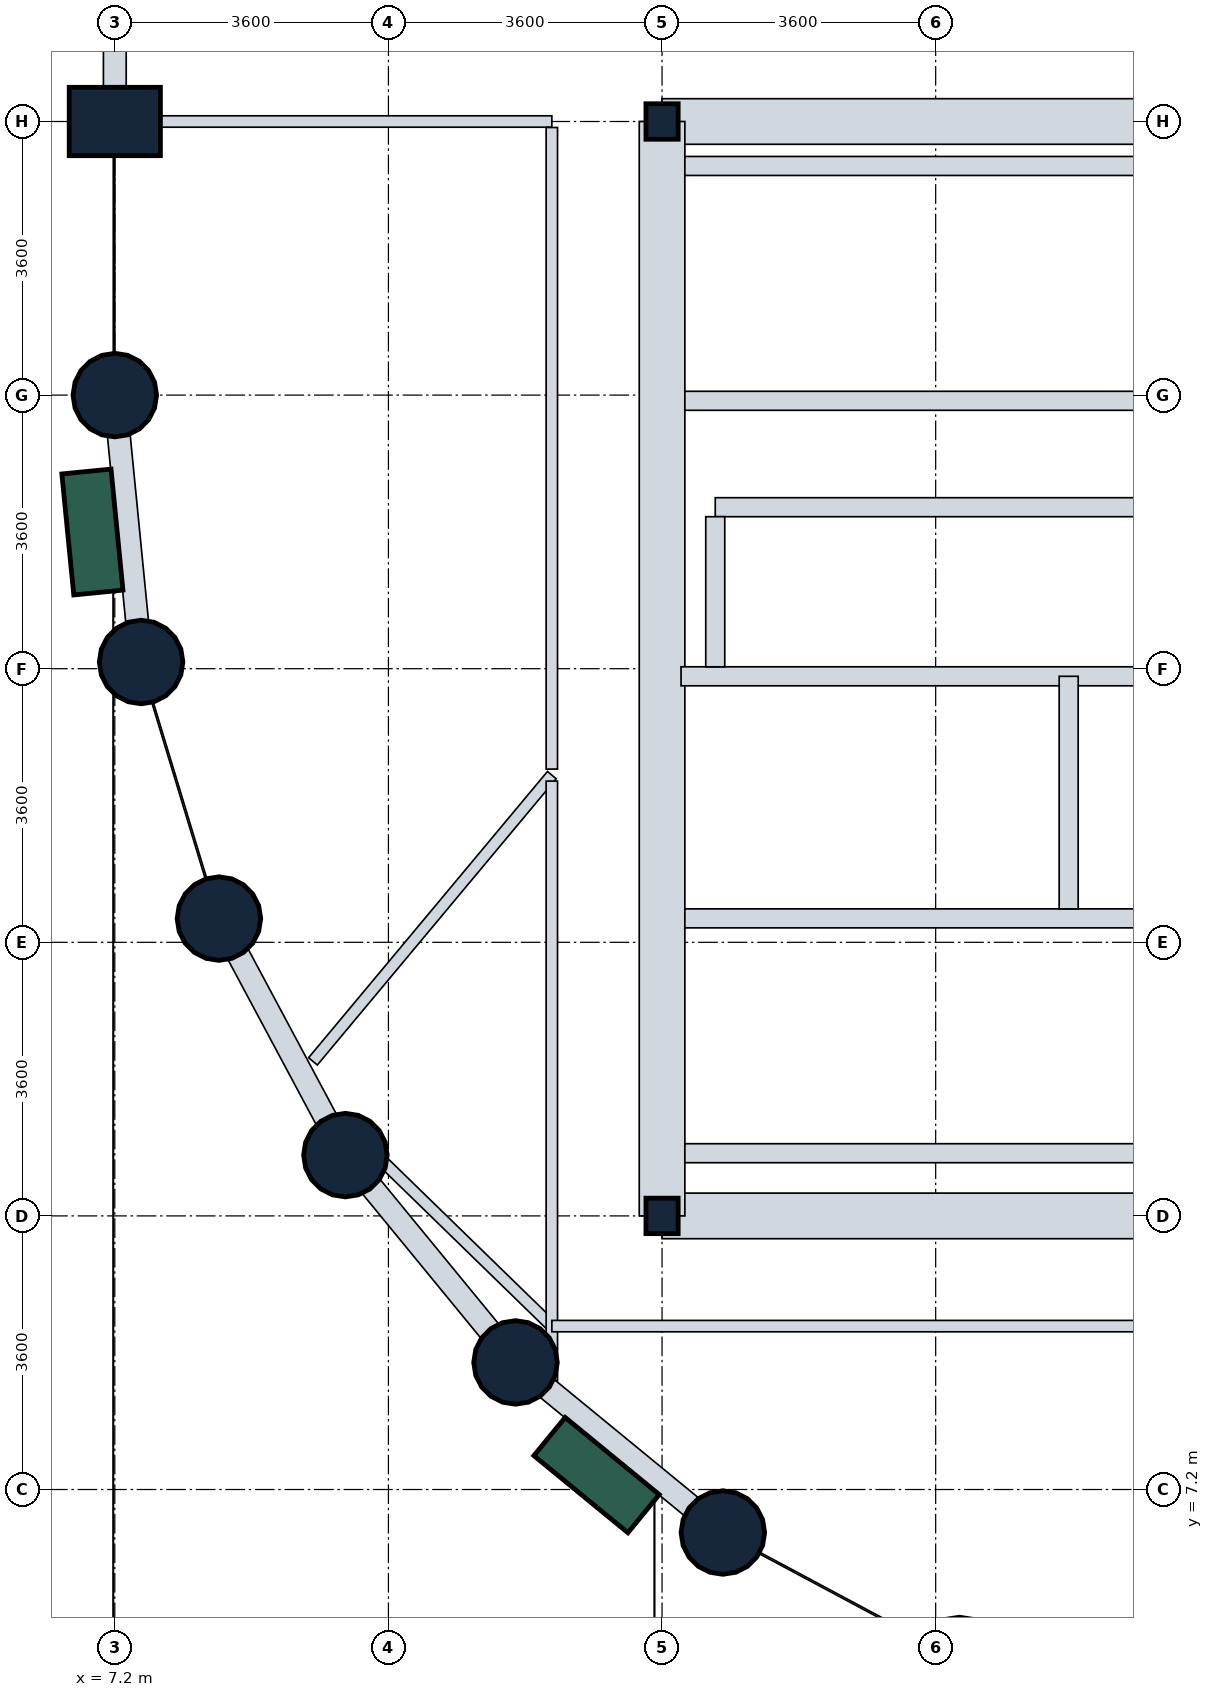
"""IFC4 building model, lengths in metres.
Left out: names, types, materials, properties, quantities, classifications, styles, units other than length and angle.
Written with IfcOpenShell. Run it as: python <this file> out.ifc"""

import sys

from ifc_helpers import new_model, si_unit, direction, frame, frame_2d, origin, origin_2d, place, context, subcontext, project, spatial, rectangle, circle, i_section, extrude, element, fill, save


model = new_model("IFC4")
c1 = context("Model", 3, precision=1e-05, world=origin(), true_north=direction((0.0, 1.0)))
c2 = subcontext(c1, "Body", "Model", "MODEL_VIEW")
j1 = project(units=[si_unit("LENGTHUNIT", "METRE"), si_unit("PLANEANGLEUNIT", "RADIAN")], contexts=[c1])
p1 = place(None, origin())
s1 = spatial("IfcSite", under=j1, at=p1, CompositionType="ELEMENT")
p2 = place(p1, origin())
s2 = spatial("IfcBuilding", under=s1, at=p2, CompositionType="ELEMENT")
p3 = place(p2, frame((0.0, 0.0, 24.0)))
s3 = spatial("IfcBuildingStorey", under=s2, at=p3, CompositionType="ELEMENT", Elevation=24.0)
p4 = place(p3, frame((7.2, 21.6, 0.0), z_axis=(0.0, 0.0, 1.0), x_axis=(1.0, 0.0, 0.0)))
e1 = element("IfcColumn", 1, at=p4, inside=s3, PredefinedType="COLUMN", context=c2, shape_type="SweptSolid", body=[
    extrude(circle(Radius=0.55, at=origin_2d()), origin(), (0.0, 0.0, 1.0), 3.9),
])
p5 = place(p3, frame((7.2, 25.2, 0.0), z_axis=(0.0, 0.0, 1.0), x_axis=(0.0, 1.0, 0.0)))
e2 = element("IfcColumn", 2, at=p5, inside=s3, PredefinedType="COLUMN", context=c2, shape_type="SweptSolid", body=[
    extrude(rectangle(XDim=0.9, YDim=1.2, at=origin_2d()), origin(), (0.0, 0.0, 1.0), 3.9),
])
for number, where, z_axis, x_axis in (
    (3, (7.546, 18.088, 0.0), (0.0, 0.0, 1.0), (1.0, 0.0, 0.0)),
    (4, (8.57, 14.712, 0.0), (0.0, 0.0, 1.0), (1.0, 0.0, 0.0)),
    (5, (10.234, 11.6, 0.0), (0.0, 0.0, 1.0), (1.0, 0.0, 0.0)),
    (6, (12.472, 8.872, 0.0), (0.0, 0.0, 1.0), (1.0, 0.0, 0.0)),
):
    element("IfcColumn", number, at=place(p3, frame(where, z_axis=z_axis, x_axis=x_axis)), inside=s3, PredefinedType="COLUMN", context=c2, shape_type="SweptSolid", body=[
        extrude(circle(Radius=0.55, at=origin_2d()), origin(), (0.0, 0.0, 1.0), 3.9),
    ])
for number, where, z_axis, x_axis in (
    (7, (14.4, 10.8, 0.0), (0.0, 0.0, 1.0), (1.0, 0.0, 0.0)),
    (8, (14.4, 25.2, 0.0), (0.0, 0.0, 1.0), (1.0, 0.0, 0.0)),
):
    element("IfcColumn", number, at=place(p3, frame(where, z_axis=z_axis, x_axis=x_axis)), inside=s3, PredefinedType="COLUMN", context=c2, shape_type="SweptSolid", body=[
        extrude(i_section(OverallWidth=0.424, OverallDepth=0.467, WebThickness=0.033, FlangeThickness=0.053, FilletRadius=0.015, at=origin_2d()), origin(), (0.0, 0.0, 1.0), 3.9),
    ])
p6 = place(p3, frame((15.2, 6.634, 0.0), z_axis=(0.0, 0.0, 1.0), x_axis=(1.0, 0.0, 0.0)))
e9 = element("IfcColumn", 9, at=p6, inside=s3, PredefinedType="COLUMN", context=c2, shape_type="SweptSolid", body=[
    extrude(circle(Radius=0.55, at=origin_2d()), origin(), (0.0, 0.0, 1.0), 3.9),
])
p7 = place(p3, frame((7.2, 25.2, 0.0), z_axis=(0.0, 0.0, 1.0), x_axis=(0.0, 1.0, 0.0)))
e10 = element("IfcWall", 10, at=p7, inside=s3, PredefinedType="STANDARD", context=c2, shape_type="SweptSolid", body=[
    extrude(rectangle(XDim=3.6, YDim=0.3, at=frame_2d((1.8, 0.0))), origin(), (0.0, 0.0, 1.0), 2.93),
])
p8 = place(p3, frame((7.546, 18.088, 0.0), z_axis=(0.0, 0.0, 1.0), x_axis=(-0.09802417461, 0.995184033831, 0.0)))
e11 = element("IfcWall", 11, at=p8, inside=s3, PredefinedType="STANDARD", context=c2, shape_type="SweptSolid", body=[
    extrude(rectangle(XDim=3.529, YDim=0.3, at=frame_2d((1.765, 0.0))), origin(), (0.0, 0.0, 1.0), 2.93),
])
p9 = place(p8, frame((0.965, 0.0, 0.85)))
e12 = element("IfcOpeningElement", 12, at=p9, cuts=e11, PredefinedType="OPENING", context=c2, shape_type="SweptSolid", body=[
    extrude(rectangle(XDim=1.6, YDim=1.35, at=frame_2d((0.8, 0.675))), frame((0.0, 0.16, 0.0), z_axis=(0.0, -1.0, 0.0), x_axis=(1.0, 0.0, 0.0)), (0.0, 0.0, 1.0), 0.32),
])
p10 = place(p3, frame((10.234, 11.6, 0.0), z_axis=(0.0, 0.0, 1.0), x_axis=(-0.47151087309, 0.881860247748, 0.0)))
e13 = element("IfcWall", 13, at=p10, inside=s3, PredefinedType="STANDARD", context=c2, shape_type="SweptSolid", body=[
    extrude(rectangle(XDim=3.529, YDim=0.3, at=frame_2d((1.764, 0.0))), origin(), (0.0, 0.0, 1.0), 2.93),
])
p11 = place(p3, frame((12.472, 8.872, 0.0), z_axis=(0.0, 0.0, 1.0), x_axis=(-0.634258295121, 0.773121216285, 0.0)))
e14 = element("IfcWall", 14, at=p11, inside=s3, PredefinedType="STANDARD", context=c2, shape_type="SweptSolid", body=[
    extrude(rectangle(XDim=3.529, YDim=0.3, at=frame_2d((1.764, 0.0))), origin(), (0.0, 0.0, 1.0), 2.93),
])
p12 = place(p3, frame((15.2, 6.634, 0.0), z_axis=(0.0, 0.0, 1.0), x_axis=(-0.773121216285, 0.634258295121, 0.0)))
e15 = element("IfcWall", 15, at=p12, inside=s3, PredefinedType="STANDARD", context=c2, shape_type="SweptSolid", body=[
    extrude(rectangle(XDim=3.529, YDim=0.3, at=frame_2d((1.764, 0.0))), origin(), (0.0, 0.0, 1.0), 2.93),
])
p13 = place(p12, frame((0.964, 0.0, 0.85)))
e16 = element("IfcOpeningElement", 16, at=p13, cuts=e15, PredefinedType="OPENING", context=c2, shape_type="SweptSolid", body=[
    extrude(rectangle(XDim=1.6, YDim=1.35, at=frame_2d((0.8, 0.675))), frame((0.0, 0.16, 0.0), z_axis=(0.0, -1.0, 0.0), x_axis=(1.0, 0.0, 0.0)), (0.0, 0.0, 1.0), 0.32),
])
p14 = place(p3, frame((14.4, 10.8, 0.0), z_axis=(0.0, 0.0, 1.0), x_axis=(1.0, 0.0, 0.0)))
e17 = element("IfcWall", 17, at=p14, inside=s3, PredefinedType="SHEAR", context=c2, shape_type="SweptSolid", body=[
    extrude(rectangle(XDim=18.0, YDim=0.6, at=frame_2d((9.0, 0.0))), origin(), (0.0, 0.0, 1.0), 3.65),
])
p15 = place(p3, frame((14.4, 25.2, 0.0), z_axis=(0.0, 0.0, 1.0), x_axis=(1.0, 0.0, 0.0)))
e18 = element("IfcWall", 18, at=p15, inside=s3, PredefinedType="SHEAR", context=c2, shape_type="SweptSolid", body=[
    extrude(rectangle(XDim=14.4, YDim=0.6, at=frame_2d((7.2, 0.0))), origin(), (0.0, 0.0, 1.0), 3.65),
])
p16 = place(p3, frame((14.4, 10.8, 0.0), z_axis=(0.0, 0.0, 1.0), x_axis=(0.0, 1.0, 0.0)))
e19 = element("IfcWall", 19, at=p16, inside=s3, PredefinedType="SHEAR", context=c2, shape_type="SweptSolid", body=[
    extrude(rectangle(XDim=14.4, YDim=0.6, at=frame_2d((7.2, 0.0))), origin(), (0.0, 0.0, 1.0), 3.65),
])
p17 = place(p16, frame((11.05, 0.0, 0.0)))
e20 = element("IfcOpeningElement", 20, at=p17, cuts=e19, PredefinedType="OPENING", context=c2, shape_type="SweptSolid", body=[
    extrude(rectangle(XDim=1.1, YDim=2.1, at=frame_2d((0.55, 1.05))), frame((0.0, 0.31, 0.0), z_axis=(0.0, -1.0, 0.0), x_axis=(1.0, 0.0, 0.0)), (0.0, 0.0, 1.0), 0.62),
])
p18 = place(p16, frame((4.9, 0.0, 0.0)))
e21 = element("IfcOpeningElement", 21, at=p18, cuts=e19, PredefinedType="OPENING", context=c2, shape_type="SweptSolid", body=[
    extrude(rectangle(XDim=1.2, YDim=2.1, at=frame_2d((0.6, 1.05))), frame((0.0, 0.31, 0.0), z_axis=(0.0, -1.0, 0.0), x_axis=(1.0, 0.0, 0.0)), (0.0, 0.0, 1.0), 0.62),
])
p19 = place(p3, frame((14.7, 11.625, 0.0), z_axis=(0.0, 0.0, 1.0), x_axis=(1.0, 0.0, 0.0)))
e22 = element("IfcWall", 22, at=p19, inside=s3, PredefinedType="SHEAR", context=c2, shape_type="SweptSolid", body=[
    extrude(rectangle(XDim=8.65, YDim=0.25, at=frame_2d((4.325, 0.0))), origin(), (0.0, 0.0, 1.0), 3.65),
])
p20 = place(p3, frame((14.7, 14.715, 0.0), z_axis=(0.0, 0.0, 1.0), x_axis=(1.0, 0.0, 0.0)))
e23 = element("IfcWall", 23, at=p20, inside=s3, PredefinedType="SHEAR", context=c2, shape_type="SweptSolid", body=[
    extrude(rectangle(XDim=8.65, YDim=0.25, at=frame_2d((4.325, 0.0))), origin(), (0.0, 0.0, 1.0), 3.65),
])
p21 = place(p20, frame((0.655, 0.0, 0.0)))
e24 = element("IfcOpeningElement", 24, at=p21, cuts=e23, PredefinedType="OPENING", context=c2, shape_type="SweptSolid", body=[
    extrude(rectangle(XDim=1.1, YDim=2.1, at=frame_2d((0.55, 1.05))), frame((0.0, 0.135, 0.0), z_axis=(0.0, -1.0, 0.0), x_axis=(1.0, 0.0, 0.0)), (0.0, 0.0, 1.0), 0.27),
])
for number, where, z_axis, x_axis in (
    (25, (14.7, 21.525, 0.0), (0.0, 0.0, 1.0), (1.0, 0.0, 0.0)),
    (26, (14.7, 24.615, 0.0), (0.0, 0.0, 1.0), (1.0, 0.0, 0.0)),
):
    element("IfcWall", number, at=place(p3, frame(where, z_axis=z_axis, x_axis=x_axis)), inside=s3, PredefinedType="SHEAR", context=c2, shape_type="SweptSolid", body=[
        extrude(rectangle(XDim=8.2, YDim=0.25, at=frame_2d((4.1, 0.0))), origin(), (0.0, 0.0, 1.0), 3.65),
    ])
p22 = place(p3, frame((14.65, 17.9, 0.0), z_axis=(0.0, 0.0, 1.0), x_axis=(1.0, 0.0, 0.0)))
e27 = element("IfcWall", 27, at=p22, inside=s3, PredefinedType="PARTITIONING", context=c2, shape_type="SweptSolid", body=[
    extrude(rectangle(XDim=7.15, YDim=0.25, at=frame_2d((3.575, 0.0))), origin(), (0.0, 0.0, 1.0), 3.635),
])
p23 = place(p3, frame((19.75, 14.84, 0.0), z_axis=(0.0, 0.0, 1.0), x_axis=(0.0, 1.0, 0.0)))
e28 = element("IfcWall", 28, at=p23, inside=s3, PredefinedType="PARTITIONING", context=c2, shape_type="SweptSolid", body=[
    extrude(rectangle(XDim=3.06, YDim=0.25, at=frame_2d((1.53, 0.0))), origin(), (0.0, 0.0, 1.0), 3.635),
])
p24 = place(p23, frame((0.98, 0.0, 0.0)))
e29 = element("IfcOpeningElement", 29, at=p24, cuts=e28, PredefinedType="OPENING", context=c2, shape_type="SweptSolid", body=[
    extrude(rectangle(XDim=1.1, YDim=2.1, at=frame_2d((0.55, 1.05))), frame((0.0, 0.135, 0.0), z_axis=(0.0, -1.0, 0.0), x_axis=(1.0, 0.0, 0.0)), (0.0, 0.0, 1.0), 0.27),
])
p25 = place(p3, frame((15.1, 20.125, 0.0), z_axis=(0.0, 0.0, 1.0), x_axis=(1.0, 0.0, 0.0)))
e30 = element("IfcWall", 30, at=p25, inside=s3, PredefinedType="PARTITIONING", context=c2, shape_type="SweptSolid", body=[
    extrude(rectangle(XDim=7.55, YDim=0.25, at=frame_2d((3.775, 0.0))), origin(), (0.0, 0.0, 1.0), 3.635),
])
p26 = place(p25, frame((0.45, 0.0, 0.0)))
e31 = element("IfcOpeningElement", 31, at=p26, cuts=e30, PredefinedType="OPENING", context=c2, shape_type="SweptSolid", body=[
    extrude(rectangle(XDim=1.1, YDim=2.1, at=frame_2d((0.55, 1.05))), frame((0.0, 0.135, 0.0), z_axis=(0.0, -1.0, 0.0), x_axis=(1.0, 0.0, 0.0)), (0.0, 0.0, 1.0), 0.27),
])
p27 = place(p25, frame((2.3, 0.0, 0.0)))
e32 = element("IfcOpeningElement", 32, at=p27, cuts=e30, PredefinedType="OPENING", context=c2, shape_type="SweptSolid", body=[
    extrude(rectangle(XDim=1.1, YDim=2.1, at=frame_2d((0.55, 1.05))), frame((0.0, 0.135, 0.0), z_axis=(0.0, -1.0, 0.0), x_axis=(1.0, 0.0, 0.0)), (0.0, 0.0, 1.0), 0.27),
])
p28 = place(p25, frame((4.15, 0.0, 0.0)))
e33 = element("IfcOpeningElement", 33, at=p28, cuts=e30, PredefinedType="OPENING", context=c2, shape_type="SweptSolid", body=[
    extrude(rectangle(XDim=1.1, YDim=2.1, at=frame_2d((0.55, 1.05))), frame((0.0, 0.135, 0.0), z_axis=(0.0, -1.0, 0.0), x_axis=(1.0, 0.0, 0.0)), (0.0, 0.0, 1.0), 0.27),
])
p29 = place(p25, frame((6.0, 0.0, 0.0)))
e34 = element("IfcOpeningElement", 34, at=p29, cuts=e30, PredefinedType="OPENING", context=c2, shape_type="SweptSolid", body=[
    extrude(rectangle(XDim=1.1, YDim=2.1, at=frame_2d((0.55, 1.05))), frame((0.0, 0.135, 0.0), z_axis=(0.0, -1.0, 0.0), x_axis=(1.0, 0.0, 0.0)), (0.0, 0.0, 1.0), 0.27),
])
p30 = place(p3, frame((15.1, 18.025, 0.0), z_axis=(0.0, 0.0, 1.0), x_axis=(0.0, 1.0, 0.0)))
e35 = element("IfcWall", 35, at=p30, inside=s3, PredefinedType="PARTITIONING", context=c2, shape_type="SweptSolid", body=[
    extrude(rectangle(XDim=1.975, YDim=0.25, at=frame_2d((0.988, 0.0))), origin(), (0.0, 0.0, 1.0), 3.635),
])
p31 = place(p3, frame((7.354, 25.2, 0.0), z_axis=(0.0, 0.0, 1.0), x_axis=(1.0, 0.0, 0.0)))
e36 = element("IfcWall", 36, at=p31, inside=s3, PredefinedType="PARTITIONING", context=c2, shape_type="SweptSolid", body=[
    extrude(rectangle(XDim=5.596, YDim=0.15, at=frame_2d((2.798, 0.0))), origin(), (0.0, 0.0, 1.0), 3.635),
])
p32 = place(p3, frame((12.95, 9.35, 0.0), z_axis=(0.0, 0.0, 1.0), x_axis=(-0.716473772124, 0.697614029287, 0.0)))
e37 = element("IfcWall", 37, at=p32, inside=s3, PredefinedType="PARTITIONING", context=c2, shape_type="SweptSolid", body=[
    extrude(rectangle(XDim=3.728, YDim=0.15, at=frame_2d((1.864, 0.0))), origin(), (0.0, 0.0, 1.0), 2.93),
])
p33 = place(p3, frame((12.95, 16.6, 0.0), z_axis=(0.0, 0.0, 1.0), x_axis=(-0.640693345459, -0.767796872281, 0.0)))
e38 = element("IfcWall", 38, at=p33, inside=s3, PredefinedType="PARTITIONING", context=c2, shape_type="SweptSolid", body=[
    extrude(rectangle(XDim=4.906, YDim=0.15, at=frame_2d((2.453, 0.0))), origin(), (0.0, 0.0, 1.0), 2.93),
])
p34 = place(p3, frame((12.95, 16.679, 0.0), z_axis=(0.0, 0.0, 1.0), x_axis=(0.0, 1.0, 0.0)))
e39 = element("IfcWall", 39, at=p34, inside=s3, PredefinedType="PARTITIONING", context=c2, shape_type="SweptSolid", body=[
    extrude(rectangle(XDim=8.442, YDim=0.15, at=frame_2d((4.221, 0.0))), origin(), (0.0, 0.0, 1.0), 3.08),
])
p35 = place(p34, frame((3.721, 0.0, 0.0)))
e40 = element("IfcOpeningElement", 40, at=p35, cuts=e39, PredefinedType="OPENING", context=c2, shape_type="SweptSolid", body=[
    extrude(rectangle(XDim=1.0, YDim=2.1, at=frame_2d((0.5, 1.05))), frame((0.0, 0.085, 0.0), z_axis=(0.0, -1.0, 0.0), x_axis=(1.0, 0.0, 0.0)), (0.0, 0.0, 1.0), 0.17),
])
p36 = place(p3, frame((12.95, 8.634, 0.0), z_axis=(0.0, 0.0, 1.0), x_axis=(0.0, 1.0, 0.0)))
e41 = element("IfcWall", 41, at=p36, inside=s3, PredefinedType="PARTITIONING", context=c2, shape_type="SweptSolid", body=[
    extrude(rectangle(XDim=7.887, YDim=0.15, at=frame_2d((3.944, 0.0))), origin(), (0.0, 0.0, 1.0), 2.93),
])
p37 = place(p36, frame((4.947, 0.0, 0.0)))
e42 = element("IfcOpeningElement", 42, at=p37, cuts=e41, PredefinedType="OPENING", context=c2, shape_type="SweptSolid", body=[
    extrude(rectangle(XDim=1.0, YDim=2.1, at=frame_2d((0.5, 1.05))), frame((0.0, 0.085, 0.0), z_axis=(0.0, -1.0, 0.0), x_axis=(1.0, 0.0, 0.0)), (0.0, 0.0, 1.0), 0.17),
])
p38 = place(p3, frame((12.95, 9.35, 0.0), z_axis=(0.0, 0.0, 1.0), x_axis=(1.0, 0.0, 0.0)))
e43 = element("IfcWall", 43, at=p38, inside=s3, PredefinedType="PARTITIONING", context=c2, shape_type="SweptSolid", body=[
    extrude(rectangle(XDim=15.771, YDim=0.15, at=frame_2d((7.885, 0.0))), origin(), (0.0, 0.0, 1.0), 3.04),
])
p39 = place(p38, frame((4.836, 0.0, 0.0)))
e44 = element("IfcOpeningElement", 44, at=p39, cuts=e43, PredefinedType="OPENING", context=c2, shape_type="SweptSolid", body=[
    extrude(rectangle(XDim=1.0, YDim=2.1, at=frame_2d((0.5, 1.05))), frame((0.0, 0.085, 0.0), z_axis=(0.0, -1.0, 0.0), x_axis=(1.0, 0.0, 0.0)), (0.0, 0.0, 1.0), 0.17),
])
p40 = place(p9, origin())
e45 = element("IfcWindow", 45, at=p40, inside=s3, PartitioningType="SINGLE_PANEL", PredefinedType="WINDOW", context=c2, shape_type="SweptSolid", body=[
    extrude(rectangle(XDim=1.6, YDim=1.35, at=frame_2d((0.8, 0.675))), frame((0.0, 0.03, 0.0), z_axis=(0.0, -1.0, 0.0), x_axis=(1.0, 0.0, 0.0)), (0.0, 0.0, 1.0), 0.06),
])
fill(e12, e45)
p41 = place(p13, origin())
e46 = element("IfcWindow", 46, at=p41, inside=s3, PartitioningType="SINGLE_PANEL", PredefinedType="WINDOW", context=c2, shape_type="SweptSolid", body=[
    extrude(rectangle(XDim=1.6, YDim=1.35, at=frame_2d((0.8, 0.675))), frame((0.0, 0.03, 0.0), z_axis=(0.0, -1.0, 0.0), x_axis=(1.0, 0.0, 0.0)), (0.0, 0.0, 1.0), 0.06),
])
fill(e16, e46)
p42 = place(p21, origin())
e47 = element("IfcDoor", 47, at=p42, inside=s3, OperationType="SINGLE_SWING_LEFT", PredefinedType="DOOR", context=c2, shape_type="SweptSolid", body=[
    extrude(rectangle(XDim=1.1, YDim=2.1, at=frame_2d((0.55, 1.05))), frame((0.0, 0.025, 0.0), z_axis=(0.0, -1.0, 0.0), x_axis=(1.0, 0.0, 0.0)), (0.0, 0.0, 1.0), 0.05),
])
fill(e24, e47)
p43 = place(p17, origin())
e48 = element("IfcDoor", 48, at=p43, inside=s3, OperationType="SINGLE_SWING_RIGHT", PredefinedType="DOOR", context=c2, shape_type="SweptSolid", body=[
    extrude(rectangle(XDim=1.1, YDim=2.1, at=frame_2d((0.55, 1.05))), frame((0.0, 0.025, 0.0), z_axis=(0.0, -1.0, 0.0), x_axis=(1.0, 0.0, 0.0)), (0.0, 0.0, 1.0), 0.05),
])
fill(e20, e48)
p44 = place(p24, origin())
e49 = element("IfcDoor", 49, at=p44, inside=s3, OperationType="SLIDING_TO_LEFT", PredefinedType="DOOR", context=c2, shape_type="SweptSolid", body=[
    extrude(rectangle(XDim=1.1, YDim=2.1, at=frame_2d((0.55, 1.05))), frame((0.0, 0.025, 0.0), z_axis=(0.0, -1.0, 0.0), x_axis=(1.0, 0.0, 0.0)), (0.0, 0.0, 1.0), 0.05),
])
fill(e29, e49)
p45 = place(p18, origin())
e50 = element("IfcDoor", 50, at=p45, inside=s3, OperationType="SINGLE_SWING_RIGHT", PredefinedType="DOOR", context=c2, shape_type="SweptSolid", body=[
    extrude(rectangle(XDim=1.2, YDim=2.1, at=frame_2d((0.6, 1.05))), frame((0.0, 0.025, 0.0), z_axis=(0.0, -1.0, 0.0), x_axis=(1.0, 0.0, 0.0)), (0.0, 0.0, 1.0), 0.05),
])
fill(e21, e50)
p46 = place(p26, origin())
e51 = element("IfcDoor", 51, at=p46, inside=s3, OperationType="SLIDING_TO_LEFT", PredefinedType="DOOR", context=c2, shape_type="SweptSolid", body=[
    extrude(rectangle(XDim=1.1, YDim=2.1, at=frame_2d((0.55, 1.05))), frame((0.0, 0.025, 0.0), z_axis=(0.0, -1.0, 0.0), x_axis=(1.0, 0.0, 0.0)), (0.0, 0.0, 1.0), 0.05),
])
fill(e31, e51)
p47 = place(p27, origin())
e52 = element("IfcDoor", 52, at=p47, inside=s3, OperationType="SLIDING_TO_LEFT", PredefinedType="DOOR", context=c2, shape_type="SweptSolid", body=[
    extrude(rectangle(XDim=1.1, YDim=2.1, at=frame_2d((0.55, 1.05))), frame((0.0, 0.025, 0.0), z_axis=(0.0, -1.0, 0.0), x_axis=(1.0, 0.0, 0.0)), (0.0, 0.0, 1.0), 0.05),
])
fill(e32, e52)
p48 = place(p28, origin())
e53 = element("IfcDoor", 53, at=p48, inside=s3, OperationType="SLIDING_TO_LEFT", PredefinedType="DOOR", context=c2, shape_type="SweptSolid", body=[
    extrude(rectangle(XDim=1.1, YDim=2.1, at=frame_2d((0.55, 1.05))), frame((0.0, 0.025, 0.0), z_axis=(0.0, -1.0, 0.0), x_axis=(1.0, 0.0, 0.0)), (0.0, 0.0, 1.0), 0.05),
])
fill(e33, e53)
p49 = place(p35, origin())
e54 = element("IfcDoor", 54, at=p49, inside=s3, OperationType="SINGLE_SWING_LEFT", PredefinedType="DOOR", context=c2, shape_type="SweptSolid", body=[
    extrude(rectangle(XDim=1.0, YDim=2.1, at=frame_2d((0.5, 1.05))), frame((0.0, 0.025, 0.0), z_axis=(0.0, -1.0, 0.0), x_axis=(1.0, 0.0, 0.0)), (0.0, 0.0, 1.0), 0.05),
])
fill(e40, e54)
p50 = place(p37, origin())
e55 = element("IfcDoor", 55, at=p50, inside=s3, OperationType="SINGLE_SWING_RIGHT", PredefinedType="DOOR", context=c2, shape_type="SweptSolid", body=[
    extrude(rectangle(XDim=1.0, YDim=2.1, at=frame_2d((0.5, 1.05))), frame((0.0, 0.025, 0.0), z_axis=(0.0, -1.0, 0.0), x_axis=(1.0, 0.0, 0.0)), (0.0, 0.0, 1.0), 0.05),
])
fill(e42, e55)
p51 = place(p39, origin())
e56 = element("IfcDoor", 56, at=p51, inside=s3, OperationType="SINGLE_SWING_LEFT", PredefinedType="DOOR", context=c2, shape_type="SweptSolid", body=[
    extrude(rectangle(XDim=1.0, YDim=2.1, at=frame_2d((0.5, 1.05))), frame((0.0, 0.025, 0.0), z_axis=(0.0, -1.0, 0.0), x_axis=(1.0, 0.0, 0.0)), (0.0, 0.0, 1.0), 0.05),
])
fill(e44, e56)
save(model, sys.argv[1])
